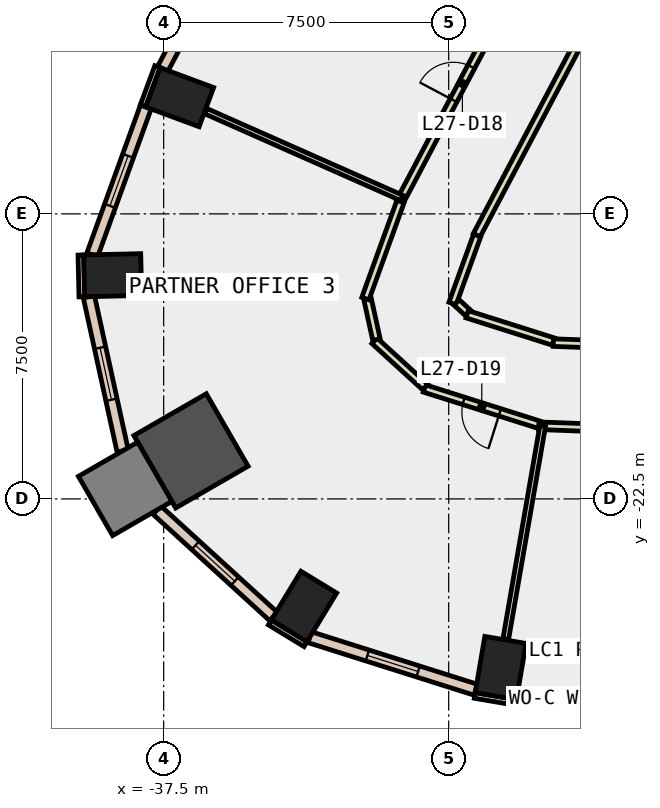
"""IFC4 building model, lengths in metres.
Left out: names, types, materials, properties, quantities, classifications, styles, units other than length and angle.
Written with IfcOpenShell. Run it as: python <this file> out.ifc"""

import sys

from ifc_helpers import new_model, si_unit, direction, frame, frame_2d, origin, origin_2d, place, context, subcontext, project, spatial, rectangle, extrude, element, fill, save


model = new_model("IFC4")
c1 = context("Model", 3, precision=1e-05, world=origin(), true_north=direction((0.0, 1.0)))
c2 = subcontext(c1, "Body", "Model", "MODEL_VIEW")
j1 = project(units=[si_unit("LENGTHUNIT", "METRE"), si_unit("PLANEANGLEUNIT", "RADIAN")], contexts=[c1])
p1 = place(None, origin())
s1 = spatial("IfcSite", under=j1, at=p1, CompositionType="ELEMENT")
p2 = place(p1, origin())
s2 = spatial("IfcBuilding", under=s1, at=p2, CompositionType="ELEMENT")
p3 = place(p2, frame((0.0, 0.0, 124.4)))
s3 = spatial("IfcBuildingStorey", under=s2, at=p3, CompositionType="ELEMENT", Elevation=124.4)
for number, where, z_axis, x_axis in (
    (1, (-28.633, -26.95, -0.4), (0.0, 0.0, 1.0), (-0.986, 0.168, 0.0)),
    (2, (-37.08, -11.931, -0.4), (0.0, 0.0, 1.0), (0.347, 0.938, 0.0)),
    (3, (-38.841, -16.614, -0.4), (0.0, 0.0, 1.0), (-0.023, 1.0, 0.0)),
):
    element("IfcColumn", number, at=place(p3, frame(where, z_axis=z_axis, x_axis=x_axis)), inside=s3, PredefinedType="COLUMN", context=c2, shape_type="SweptSolid", body=[
        extrude(rectangle(XDim=1.1, YDim=1.5, at=origin_2d()), origin(), (0.0, 0.0, 1.0), 4.2),
    ])
p4 = place(p3, frame((-36.781, -21.236, -0.4), z_axis=(0.0, 0.0, 1.0), x_axis=(0.866025403784, 0.5, 0.0)))
e4 = element("IfcColumn", 4, at=p4, inside=s3, PredefinedType="COLUMN", context=c2, shape_type="SweptSolid", body=[
    extrude(rectangle(XDim=2.2, YDim=2.2, at=origin_2d()), origin(), (0.0, 0.0, 1.0), 4.2),
])
p5 = place(p3, frame((-33.808, -25.331, -0.4), z_axis=(0.0, 0.0, 1.0), x_axis=(-0.854095929175, 0.520115510024, 0.0)))
e5 = element("IfcColumn", 5, at=p5, inside=s3, PredefinedType="COLUMN", context=c2, shape_type="SweptSolid", body=[
    extrude(rectangle(XDim=1.1, YDim=1.5, at=origin_2d()), origin(), (0.0, 0.0, 1.0), 4.2),
])
p6 = place(p3, frame((-38.513, -22.236, -0.4), z_axis=(0.0, 0.0, 1.0), x_axis=(0.866025403784, 0.5, 0.0)))
e6 = element("IfcColumn", 6, at=p6, inside=s3, PredefinedType="COLUMN", context=c2, shape_type="SweptSolid", body=[
    extrude(rectangle(XDim=1.8, YDim=1.8, at=origin_2d()), origin(), (0.0, 0.0, 1.0), 4.2),
])
p7 = place(p3, frame((-37.663, -11.128, 0.0), z_axis=(0.0, 0.0, 1.0), x_axis=(-0.347010833361, -0.937861120598, 0.0)))
e7 = element("IfcWall", 7, at=p7, inside=s3, PredefinedType="STANDARD", context=c2, shape_type="SweptSolid", body=[
    extrude(rectangle(XDim=1.1, YDim=0.15, at=frame_2d((0.55, 0.0))), origin(), (0.0, 0.0, 1.0), 3.8),
])
p8 = place(p3, frame((-29.314, -27.671, 0.0), z_axis=(0.0, 0.0, 1.0), x_axis=(0.985763338892, -0.168138751323, 0.0)))
e8 = element("IfcWall", 8, at=p8, inside=s3, PredefinedType="STANDARD", context=c2, shape_type="SweptSolid", body=[
    extrude(rectangle(XDim=1.101, YDim=0.15, at=frame_2d((0.55, 0.0))), origin(), (0.0, 0.0, 1.0), 3.8),
])
for number, where, z_axis, x_axis in (
    (9, (-39.679, -16.083, 0.0), (0.0, 0.0, 1.0), (0.024, -1.0, 0.0)),
    (10, (-34.707, -25.75, 0.0), (0.0, 0.0, 1.0), (0.854, -0.52, 0.0)),
):
    element("IfcWall", number, at=place(p3, frame(where, z_axis=z_axis, x_axis=x_axis)), inside=s3, PredefinedType="STANDARD", context=c2, shape_type="SweptSolid", body=[
        extrude(rectangle(XDim=1.1, YDim=0.15, at=frame_2d((0.55, 0.0))), origin(), (0.0, 0.0, 1.0), 3.8),
    ])
p9 = place(p3, frame((-28.205, -27.708, 0.0), z_axis=(0.0, 0.0, 1.0), x_axis=(0.999317846462, -0.036930228031, 0.0)))
e11 = element("IfcWall", 11, at=p9, inside=s3, PredefinedType="STANDARD", context=c2, shape_type="SweptSolid", body=[
    extrude(rectangle(XDim=5.877, YDim=0.3, at=frame_2d((2.938, 0.0))), origin(), (0.0, 0.0, 1.0), 3.8),
])
p10 = place(p9, frame((0.469, 0.0, 0.9)))
e12 = element("IfcOpeningElement", 12, at=p10, cuts=e11, PredefinedType="OPENING", context=c2, shape_type="SweptSolid", body=[
    extrude(rectangle(XDim=2.0, YDim=2.6, at=frame_2d((1.0, 1.3))), frame((0.0, 0.16, 0.0), z_axis=(0.0, -1.0, 0.0), x_axis=(1.0, 0.0, 0.0)), (0.0, 0.0, 1.0), 0.32),
])
p11 = place(p9, frame((3.408, 0.0, 0.9)))
e13 = element("IfcOpeningElement", 13, at=p11, cuts=e11, PredefinedType="OPENING", context=c2, shape_type="SweptSolid", body=[
    extrude(rectangle(XDim=2.0, YDim=2.6, at=frame_2d((1.0, 1.3))), frame((0.0, 0.16, 0.0), z_axis=(0.0, -1.0, 0.0), x_axis=(1.0, 0.0, 0.0)), (0.0, 0.0, 1.0), 0.32),
])
p12 = place(p3, frame((-34.593, -5.643, 0.0), z_axis=(0.0, 0.0, 1.0), x_axis=(-0.467654949391, -0.883911108828, 0.0)))
e14 = element("IfcWall", 14, at=p12, inside=s3, PredefinedType="STANDARD", context=c2, shape_type="SweptSolid", body=[
    extrude(rectangle(XDim=6.265, YDim=0.3, at=frame_2d((3.133, 0.0))), origin(), (0.0, 0.0, 1.0), 3.8),
])
p13 = place(p12, frame((0.566, 0.0, 0.9)))
e15 = element("IfcOpeningElement", 15, at=p13, cuts=e14, PredefinedType="OPENING", context=c2, shape_type="SweptSolid", body=[
    extrude(rectangle(XDim=2.0, YDim=2.6, at=frame_2d((1.0, 1.3))), frame((0.0, 0.16, 0.0), z_axis=(0.0, -1.0, 0.0), x_axis=(1.0, 0.0, 0.0)), (0.0, 0.0, 1.0), 0.32),
])
p14 = place(p12, frame((3.699, 0.0, 0.9)))
e16 = element("IfcOpeningElement", 16, at=p14, cuts=e14, PredefinedType="OPENING", context=c2, shape_type="SweptSolid", body=[
    extrude(rectangle(XDim=2.0, YDim=2.6, at=frame_2d((1.0, 1.3))), frame((0.0, 0.16, 0.0), z_axis=(0.0, -1.0, 0.0), x_axis=(1.0, 0.0, 0.0)), (0.0, 0.0, 1.0), 0.32),
])
p15 = place(p3, frame((-37.97, -12.186, 0.0), z_axis=(0.0, 0.0, 1.0), x_axis=(-0.340477955209, -0.940252499075, 0.0)))
e17 = element("IfcWall", 17, at=p15, inside=s3, PredefinedType="STANDARD", context=c2, shape_type="SweptSolid", body=[
    extrude(rectangle(XDim=4.138, YDim=0.3, at=frame_2d((2.069, 0.0))), origin(), (0.0, 0.0, 1.0), 3.8),
])
p16 = place(p15, frame((1.369, 0.0, 0.9)))
e18 = element("IfcOpeningElement", 18, at=p16, cuts=e17, PredefinedType="OPENING", context=c2, shape_type="SweptSolid", body=[
    extrude(rectangle(XDim=1.4, YDim=2.6, at=frame_2d((0.7, 1.3))), frame((0.0, 0.16, 0.0), z_axis=(0.0, -1.0, 0.0), x_axis=(1.0, 0.0, 0.0)), (0.0, 0.0, 1.0), 0.32),
])
p17 = place(p3, frame((-39.468, -17.178, 0.0), z_axis=(0.0, 0.0, 1.0), x_axis=(0.2139737857, -0.976839402887, 0.0)))
e19 = element("IfcWall", 19, at=p17, inside=s3, PredefinedType="STANDARD", context=c2, shape_type="SweptSolid", body=[
    extrude(rectangle(XDim=4.154, YDim=0.3, at=frame_2d((2.077, 0.0))), origin(), (0.0, 0.0, 1.0), 3.8),
])
p18 = place(p17, frame((1.377, 0.0, 0.9)))
e20 = element("IfcOpeningElement", 20, at=p18, cuts=e19, PredefinedType="OPENING", context=c2, shape_type="SweptSolid", body=[
    extrude(rectangle(XDim=1.4, YDim=2.6, at=frame_2d((0.7, 1.3))), frame((0.0, 0.16, 0.0), z_axis=(0.0, -1.0, 0.0), x_axis=(1.0, 0.0, 0.0)), (0.0, 0.0, 1.0), 0.32),
])
p19 = place(p3, frame((-37.68, -22.793, 0.0), z_axis=(0.0, 0.0, 1.0), x_axis=(0.738825046606, -0.673897284835, 0.0)))
e21 = element("IfcWall", 21, at=p19, inside=s3, PredefinedType="STANDARD", context=c2, shape_type="SweptSolid", body=[
    extrude(rectangle(XDim=4.155, YDim=0.3, at=frame_2d((2.078, 0.0))), origin(), (0.0, 0.0, 1.0), 3.8),
])
p20 = place(p19, frame((1.378, 0.0, 0.9)))
e22 = element("IfcOpeningElement", 22, at=p20, cuts=e21, PredefinedType="OPENING", context=c2, shape_type="SweptSolid", body=[
    extrude(rectangle(XDim=1.4, YDim=2.6, at=frame_2d((0.7, 1.3))), frame((0.0, 0.16, 0.0), z_axis=(0.0, -1.0, 0.0), x_axis=(1.0, 0.0, 0.0)), (0.0, 0.0, 1.0), 0.32),
])
p21 = place(p3, frame((-33.657, -26.139, 0.0), z_axis=(0.0, 0.0, 1.0), x_axis=(0.953449736988, -0.301551983971, 0.0)))
e23 = element("IfcWall", 23, at=p21, inside=s3, PredefinedType="STANDARD", context=c2, shape_type="SweptSolid", body=[
    extrude(rectangle(XDim=4.583, YDim=0.3, at=frame_2d((2.292, 0.0))), origin(), (0.0, 0.0, 1.0), 3.8),
])
p22 = place(p21, frame((1.592, 0.0, 0.9)))
e24 = element("IfcOpeningElement", 24, at=p22, cuts=e23, PredefinedType="OPENING", context=c2, shape_type="SweptSolid", body=[
    extrude(rectangle(XDim=1.4, YDim=2.6, at=frame_2d((0.7, 1.3))), frame((0.0, 0.16, 0.0), z_axis=(0.0, -1.0, 0.0), x_axis=(1.0, 0.0, 0.0)), (0.0, 0.0, 1.0), 0.32),
])
p23 = place(p3, frame((-26.095, -9.574, 0.0), z_axis=(0.0, 0.0, 1.0), x_axis=(-0.467631129673, -0.883923710826, 0.0)))
e25 = element("IfcWall", 25, at=p23, inside=s3, PredefinedType="PARTITIONING", context=c2, shape_type="SweptSolid", body=[
    extrude(rectangle(XDim=6.777, YDim=0.2, at=frame_2d((3.388, 0.0))), origin(), (0.0, 0.0, 1.0), 3.8),
])
p24 = place(p3, frame((-29.251, -15.569, 0.0), z_axis=(0.0, 0.0, 1.0), x_axis=(-0.340403936609, -0.940279298901, 0.0)))
e26 = element("IfcWall", 26, at=p24, inside=s3, PredefinedType="PARTITIONING", context=c2, shape_type="SweptSolid", body=[
    extrude(rectangle(XDim=1.904, YDim=0.2, at=frame_2d((0.952, 0.0))), origin(), (0.0, 0.0, 1.0), 3.8),
])
p25 = place(p3, frame((-29.792, -17.332, 0.0), z_axis=(0.0, 0.0, 1.0), x_axis=(0.738629069284, -0.674112081192, 0.0)))
e27 = element("IfcWall", 27, at=p25, inside=s3, PredefinedType="PARTITIONING", context=c2, shape_type="SweptSolid", body=[
    extrude(rectangle(XDim=0.405, YDim=0.2, at=frame_2d((0.202, 0.0))), origin(), (0.0, 0.0, 1.0), 3.8),
])
p26 = place(p3, frame((-29.514, -17.642, 0.0), z_axis=(0.0, 0.0, 1.0), x_axis=(0.953398231748, -0.301714785353, 0.0)))
e28 = element("IfcWall", 28, at=p26, inside=s3, PredefinedType="PARTITIONING", context=c2, shape_type="SweptSolid", body=[
    extrude(rectangle(XDim=2.383, YDim=0.2, at=frame_2d((1.191, 0.0))), origin(), (0.0, 0.0, 1.0), 3.8),
])
p27 = place(p3, frame((-27.247, -18.387, 0.0), z_axis=(0.0, 0.0, 1.0), x_axis=(0.999316109669, -0.036977195089, 0.0)))
e29 = element("IfcWall", 29, at=p27, inside=s3, PredefinedType="PARTITIONING", context=c2, shape_type="SweptSolid", body=[
    extrude(rectangle(XDim=5.764, YDim=0.2, at=frame_2d((2.882, 0.0))), origin(), (0.0, 0.0, 1.0), 3.8),
])
p28 = place(p3, frame((-31.28, -14.67, 0.0), z_axis=(0.0, 0.0, 1.0), x_axis=(0.4676622466, 0.883907248022, 0.0)))
e30 = element("IfcWall", 30, at=p28, inside=s3, PredefinedType="PARTITIONING", context=c2, shape_type="SweptSolid", body=[
    extrude(rectangle(XDim=6.866, YDim=0.2, at=frame_2d((3.433, 0.0))), origin(), (0.0, 0.0, 1.0), 3.8),
])
p29 = place(p28, frame((3.008, 0.0, 0.0)))
e31 = element("IfcOpeningElement", 31, at=p29, cuts=e30, PredefinedType="OPENING", context=c2, shape_type="SweptSolid", body=[
    extrude(rectangle(XDim=1.0, YDim=2.1, at=frame_2d((0.5, 1.05))), frame((0.0, 0.11, 0.0), z_axis=(0.0, -1.0, 0.0), x_axis=(1.0, 0.0, 0.0)), (0.0, 0.0, 1.0), 0.22),
])
p30 = place(p3, frame((-27.621, -20.548, 0.0), z_axis=(0.0, 0.0, 1.0), x_axis=(-0.953482354465, 0.301448834338, 0.0)))
e32 = element("IfcWall", 32, at=p30, inside=s3, PredefinedType="PARTITIONING", context=c2, shape_type="SweptSolid", body=[
    extrude(rectangle(XDim=3.165, YDim=0.2, at=frame_2d((1.583, 0.0))), origin(), (0.0, 0.0, 1.0), 3.8),
])
p31 = place(p30, frame((1.082, 0.0, 0.0)))
e33 = element("IfcOpeningElement", 33, at=p31, cuts=e32, PredefinedType="OPENING", context=c2, shape_type="SweptSolid", body=[
    extrude(rectangle(XDim=1.0, YDim=2.1, at=frame_2d((0.5, 1.05))), frame((0.0, 0.11, 0.0), z_axis=(0.0, -1.0, 0.0), x_axis=(1.0, 0.0, 0.0)), (0.0, 0.0, 1.0), 0.22),
])
p32 = place(p3, frame((-30.617, -19.557, 0.0), z_axis=(0.0, 0.0, 1.0), x_axis=(-0.739034946694, 0.673667089567, 0.0)))
e34 = element("IfcWall", 34, at=p32, inside=s3, PredefinedType="PARTITIONING", context=c2, shape_type="SweptSolid", body=[
    extrude(rectangle(XDim=1.808, YDim=0.2, at=frame_2d((0.904, 0.0))), origin(), (0.0, 0.0, 1.0), 3.8),
])
p33 = place(p3, frame((-31.901, -18.308, 0.0), z_axis=(0.0, 0.0, 1.0), x_axis=(-0.214278387947, 0.976772630891, 0.0)))
e35 = element("IfcWall", 35, at=p33, inside=s3, PredefinedType="PARTITIONING", context=c2, shape_type="SweptSolid", body=[
    extrude(rectangle(XDim=1.102, YDim=0.2, at=frame_2d((0.551, 0.0))), origin(), (0.0, 0.0, 1.0), 3.8),
])
p34 = place(p3, frame((-32.192, -17.229, 0.0), z_axis=(0.0, 0.0, 1.0), x_axis=(0.340269739222, 0.940327870782, 0.0)))
e36 = element("IfcWall", 36, at=p34, inside=s3, PredefinedType="PARTITIONING", context=c2, shape_type="SweptSolid", body=[
    extrude(rectangle(XDim=2.715, YDim=0.2, at=frame_2d((1.357, 0.0))), origin(), (0.0, 0.0, 1.0), 3.8),
])
p35 = place(p3, frame((-21.557, -20.799, 0.0), z_axis=(0.0, 0.0, 1.0), x_axis=(-0.99931884782, 0.036903121698, 0.0)))
e37 = element("IfcWall", 37, at=p35, inside=s3, PredefinedType="PARTITIONING", context=c2, shape_type="SweptSolid", body=[
    extrude(rectangle(XDim=6.073, YDim=0.2, at=frame_2d((3.037, 0.0))), origin(), (0.0, 0.0, 1.0), 3.8),
])
p36 = place(p3, frame((-31.233, -14.582, 0.0), z_axis=(0.0, 0.0, 1.0), x_axis=(-0.914317360249, 0.404998474994, 0.0)))
e38 = element("IfcWall", 38, at=p36, inside=s3, PredefinedType="PARTITIONING", context=c2, shape_type="SweptSolid", body=[
    extrude(rectangle(XDim=5.645, YDim=0.15, at=frame_2d((2.822, 0.0))), origin(), (0.0, 0.0, 1.0), 3.8),
])
p37 = place(p3, frame((-27.526, -20.578, 0.0), z_axis=(0.0, 0.0, 1.0), x_axis=(-0.170795043313, -0.985306578269, 0.0)))
e39 = element("IfcWall", 39, at=p37, inside=s3, PredefinedType="PARTITIONING", context=c2, shape_type="SweptSolid", body=[
    extrude(rectangle(XDim=5.698, YDim=0.15, at=frame_2d((2.849, 0.0))), origin(), (0.0, 0.0, 1.0), 3.8),
])
p38 = place(p10, origin())
e40 = element("IfcWindow", 40, at=p38, inside=s3, PartitioningType="SINGLE_PANEL", PredefinedType="WINDOW", context=c2, shape_type="SweptSolid", body=[
    extrude(rectangle(XDim=2.0, YDim=2.6, at=frame_2d((1.0, 1.3))), frame((0.0, 0.03, 0.0), z_axis=(0.0, -1.0, 0.0), x_axis=(1.0, 0.0, 0.0)), (0.0, 0.0, 1.0), 0.06),
])
fill(e12, e40)
p39 = place(p16, origin())
e41 = element("IfcWindow", 41, at=p39, inside=s3, PartitioningType="SINGLE_PANEL", PredefinedType="WINDOW", context=c2, shape_type="SweptSolid", body=[
    extrude(rectangle(XDim=1.4, YDim=2.6, at=frame_2d((0.7, 1.3))), frame((0.0, 0.03, 0.0), z_axis=(0.0, -1.0, 0.0), x_axis=(1.0, 0.0, 0.0)), (0.0, 0.0, 1.0), 0.06),
])
fill(e18, e41)
p40 = place(p18, origin())
e42 = element("IfcWindow", 42, at=p40, inside=s3, PartitioningType="SINGLE_PANEL", PredefinedType="WINDOW", context=c2, shape_type="SweptSolid", body=[
    extrude(rectangle(XDim=1.4, YDim=2.6, at=frame_2d((0.7, 1.3))), frame((0.0, 0.03, 0.0), z_axis=(0.0, -1.0, 0.0), x_axis=(1.0, 0.0, 0.0)), (0.0, 0.0, 1.0), 0.06),
])
fill(e20, e42)
p41 = place(p20, origin())
e43 = element("IfcWindow", 43, at=p41, inside=s3, PartitioningType="SINGLE_PANEL", PredefinedType="WINDOW", context=c2, shape_type="SweptSolid", body=[
    extrude(rectangle(XDim=1.4, YDim=2.6, at=frame_2d((0.7, 1.3))), frame((0.0, 0.03, 0.0), z_axis=(0.0, -1.0, 0.0), x_axis=(1.0, 0.0, 0.0)), (0.0, 0.0, 1.0), 0.06),
])
fill(e22, e43)
p42 = place(p22, origin())
e44 = element("IfcWindow", 44, at=p42, inside=s3, PartitioningType="SINGLE_PANEL", PredefinedType="WINDOW", context=c2, shape_type="SweptSolid", body=[
    extrude(rectangle(XDim=1.4, YDim=2.6, at=frame_2d((0.7, 1.3))), frame((0.0, 0.03, 0.0), z_axis=(0.0, -1.0, 0.0), x_axis=(1.0, 0.0, 0.0)), (0.0, 0.0, 1.0), 0.06),
])
fill(e24, e44)
p43 = place(p29, origin())
e45 = element("IfcDoor", 45, at=p43, inside=s3, OperationType="SINGLE_SWING_LEFT", PredefinedType="DOOR", context=c2, shape_type="SweptSolid", body=[
    extrude(rectangle(XDim=1.0, YDim=2.1, at=frame_2d((0.5, 1.05))), frame((0.0, 0.025, 0.0), z_axis=(0.0, -1.0, 0.0), x_axis=(1.0, 0.0, 0.0)), (0.0, 0.0, 1.0), 0.05),
])
fill(e31, e45)
p44 = place(p31, origin())
e46 = element("IfcDoor", 46, at=p44, inside=s3, OperationType="SINGLE_SWING_RIGHT", PredefinedType="DOOR", context=c2, shape_type="SweptSolid", body=[
    extrude(rectangle(XDim=1.0, YDim=2.1, at=frame_2d((0.5, 1.05))), frame((0.0, 0.025, 0.0), z_axis=(0.0, -1.0, 0.0), x_axis=(1.0, 0.0, 0.0)), (0.0, 0.0, 1.0), 0.05),
])
fill(e33, e46)
save(model, sys.argv[1])
